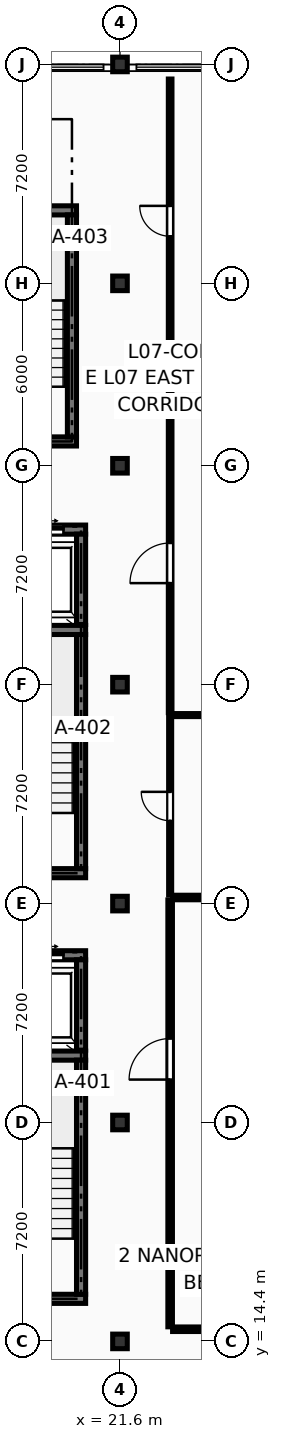
"""IFC4 building model, lengths in metres.
Left out: names, types, materials, properties, quantities, classifications, styles, units other than length and angle.
Written with IfcOpenShell. Run it as: python <this file> out.ifc"""

import sys

from ifc_helpers import new_model, si_unit, direction, frame, frame_2d, origin, origin_2d, place, context, subcontext, project, spatial, rectangle, extrude, element, fill, save


model = new_model("IFC4")
c1 = context("Model", 3, precision=1e-05, world=origin(), true_north=direction((0.0, 1.0)))
c2 = subcontext(c1, "Body", "Model", "MODEL_VIEW")
j1 = project(units=[si_unit("LENGTHUNIT", "METRE"), si_unit("PLANEANGLEUNIT", "RADIAN")], contexts=[c1])
p1 = place(None, origin())
s1 = spatial("IfcSite", under=j1, at=p1, CompositionType="ELEMENT")
p2 = place(p1, origin())
s2 = spatial("IfcBuilding", under=s1, at=p2, CompositionType="ELEMENT")
p3 = place(p2, frame((0.0, 0.0, 26.25)))
s3 = spatial("IfcBuildingStorey", under=s2, at=p3, CompositionType="ELEMENT", Elevation=26.25)
for number, where, z_axis, x_axis in (
    (1, (21.6, 14.4, 0.0), (0.0, 0.0, 1.0), (1.0, 0.0, 0.0)),
    (2, (21.6, 21.6, 0.0), (0.0, 0.0, 1.0), (1.0, 0.0, 0.0)),
    (3, (21.6, 28.8, 0.0), (0.0, 0.0, 1.0), (1.0, 0.0, 0.0)),
    (4, (21.6, 36.0, 0.0), (0.0, 0.0, 1.0), (1.0, 0.0, 0.0)),
    (5, (21.6, 43.2, 0.0), (0.0, 0.0, 1.0), (1.0, 0.0, 0.0)),
    (6, (21.6, 49.2, 0.0), (0.0, 0.0, 1.0), (1.0, 0.0, 0.0)),
    (7, (21.6, 56.4, 0.0), (0.0, 0.0, 1.0), (1.0, 0.0, 0.0)),
):
    element("IfcColumn", number, at=place(p3, frame(where, z_axis=z_axis, x_axis=x_axis)), inside=s3, PredefinedType="COLUMN", context=c2, shape_type="SweptSolid", body=[
        extrude(rectangle(XDim=0.48, YDim=0.48, at=origin_2d()), origin(), (0.0, 0.0, 1.0), 3.45),
    ])
for number, where, z_axis, x_axis in (
    (8, (15.65, 15.8, 0.0), (0.0, 0.0, 1.0), (1.0, 0.0, 0.0)),
    (9, (15.65, 23.8, 0.0), (0.0, 0.0, 1.0), (1.0, 0.0, 0.0)),
):
    element("IfcWall", number, at=place(p3, frame(where, z_axis=z_axis, x_axis=x_axis)), inside=s3, PredefinedType="SHEAR", context=c2, shape_type="SweptSolid", body=[
        extrude(rectangle(XDim=4.82, YDim=0.3, at=frame_2d((2.41, 0.0))), origin(), (0.0, 0.0, 1.0), 3.24),
    ])
p4 = place(p3, frame((20.32, 15.95, 0.0), z_axis=(0.0, 0.0, 1.0), x_axis=(0.0, 1.0, 0.0)))
e10 = element("IfcWall", 10, at=p4, inside=s3, PredefinedType="SHEAR", context=c2, shape_type="SweptSolid", body=[
    extrude(rectangle(XDim=7.7, YDim=0.3, at=frame_2d((3.85, 0.0))), origin(), (0.0, 0.0, 1.0), 3.24),
])
for number, where, z_axis, x_axis in (
    (11, (15.65, 29.8, 0.0), (0.0, 0.0, 1.0), (1.0, 0.0, 0.0)),
    (12, (15.65, 37.8, 0.0), (0.0, 0.0, 1.0), (1.0, 0.0, 0.0)),
):
    element("IfcWall", number, at=place(p3, frame(where, z_axis=z_axis, x_axis=x_axis)), inside=s3, PredefinedType="SHEAR", context=c2, shape_type="SweptSolid", body=[
        extrude(rectangle(XDim=4.82, YDim=0.3, at=frame_2d((2.41, 0.0))), origin(), (0.0, 0.0, 1.0), 3.24),
    ])
p5 = place(p3, frame((20.32, 29.95, 0.0), z_axis=(0.0, 0.0, 1.0), x_axis=(0.0, 1.0, 0.0)))
e13 = element("IfcWall", 13, at=p5, inside=s3, PredefinedType="SHEAR", context=c2, shape_type="SweptSolid", body=[
    extrude(rectangle(XDim=7.7, YDim=0.3, at=frame_2d((3.85, 0.0))), origin(), (0.0, 0.0, 1.0), 3.24),
])
for number, where, z_axis, x_axis in (
    (14, (15.75, 44.0, 0.0), (0.0, 0.0, 1.0), (1.0, 0.0, 0.0)),
    (15, (15.75, 51.6, 0.0), (0.0, 0.0, 1.0), (1.0, 0.0, 0.0)),
):
    element("IfcWall", number, at=place(p3, frame(where, z_axis=z_axis, x_axis=x_axis)), inside=s3, PredefinedType="SHEAR", context=c2, shape_type="SweptSolid", body=[
        extrude(rectangle(XDim=4.42, YDim=0.3, at=frame_2d((2.21, 0.0))), origin(), (0.0, 0.0, 1.0), 3.24),
    ])
p6 = place(p3, frame((20.02, 44.15, 0.0), z_axis=(0.0, 0.0, 1.0), x_axis=(0.0, 1.0, 0.0)))
e16 = element("IfcWall", 16, at=p6, inside=s3, PredefinedType="SHEAR", context=c2, shape_type="SweptSolid", body=[
    extrude(rectangle(XDim=7.3, YDim=0.3, at=frame_2d((3.65, 0.0))), origin(), (0.0, 0.0, 1.0), 3.24),
])
p7 = place(p3, frame((17.91, 27.1, 0.0), z_axis=(0.0, 0.0, 1.0), x_axis=(1.0, 0.0, 0.0)))
e17 = element("IfcWall", 17, at=p7, inside=s3, PredefinedType="SHEAR", context=c2, shape_type="SweptSolid", body=[
    extrude(rectangle(XDim=2.56, YDim=0.3, at=frame_2d((1.28, 0.0))), origin(), (0.0, 0.0, 1.0), 3.24),
])
p8 = place(p7, frame((0.73, 0.0, 0.0)))
e18 = element("IfcOpeningElement", 18, at=p8, cuts=e17, PredefinedType="OPENING", context=c2, shape_type="SweptSolid", body=[
    extrude(rectangle(XDim=1.1, YDim=2.2, at=frame_2d((0.55, 1.1))), frame((0.0, 0.162, 0.0), z_axis=(0.0, -1.0, 0.0), x_axis=(1.0, 0.0, 0.0)), (0.0, 0.0, 1.0), 0.324),
])
p9 = place(p3, frame((20.32, 23.98, 0.0), z_axis=(0.0, 0.0, 1.0), x_axis=(0.0, 1.0, 0.0)))
e19 = element("IfcWall", 19, at=p9, inside=s3, PredefinedType="SHEAR", context=c2, shape_type="SweptSolid", body=[
    extrude(rectangle(XDim=2.97, YDim=0.3, at=frame_2d((1.485, 0.0))), origin(), (0.0, 0.0, 1.0), 3.24),
])
p10 = place(p3, frame((17.91, 41.1, 0.0), z_axis=(0.0, 0.0, 1.0), x_axis=(1.0, 0.0, 0.0)))
e20 = element("IfcWall", 20, at=p10, inside=s3, PredefinedType="SHEAR", context=c2, shape_type="SweptSolid", body=[
    extrude(rectangle(XDim=2.56, YDim=0.3, at=frame_2d((1.28, 0.0))), origin(), (0.0, 0.0, 1.0), 3.24),
])
p11 = place(p10, frame((0.73, 0.0, 0.0)))
e21 = element("IfcOpeningElement", 21, at=p11, cuts=e20, PredefinedType="OPENING", context=c2, shape_type="SweptSolid", body=[
    extrude(rectangle(XDim=1.1, YDim=2.2, at=frame_2d((0.55, 1.1))), frame((0.0, 0.162, 0.0), z_axis=(0.0, -1.0, 0.0), x_axis=(1.0, 0.0, 0.0)), (0.0, 0.0, 1.0), 0.324),
])
p12 = place(p3, frame((20.32, 37.98, 0.0), z_axis=(0.0, 0.0, 1.0), x_axis=(0.0, 1.0, 0.0)))
e22 = element("IfcWall", 22, at=p12, inside=s3, PredefinedType="SHEAR", context=c2, shape_type="SweptSolid", body=[
    extrude(rectangle(XDim=2.97, YDim=0.3, at=frame_2d((1.485, 0.0))), origin(), (0.0, 0.0, 1.0), 3.24),
])
p13 = place(p3, frame((23.25, 14.88, 0.0), z_axis=(0.0, 0.0, 1.0), x_axis=(0.0, 1.0, 0.0)))
e23 = element("IfcWall", 23, at=p13, inside=s3, PredefinedType="PARTITIONING", context=c2, shape_type="SweptSolid", body=[
    extrude(rectangle(XDim=14.04, YDim=0.15, at=frame_2d((7.02, 0.0))), origin(), (0.0, 0.0, 1.0), 3.225),
])
p14 = place(p13, frame((8.132, 0.0, 0.0)))
e24 = element("IfcOpeningElement", 24, at=p14, cuts=e23, PredefinedType="OPENING", context=c2, shape_type="SweptSolid", body=[
    extrude(rectangle(XDim=1.35, YDim=2.2, at=frame_2d((0.675, 1.1))), frame((0.0, 0.087, 0.0), z_axis=(0.0, -1.0, 0.0), x_axis=(1.0, 0.0, 0.0)), (0.0, 0.0, 1.0), 0.174),
])
p15 = place(p3, frame((23.33, 14.8, 0.0), z_axis=(0.0, 0.0, 1.0), x_axis=(1.0, 0.0, 0.0)))
e25 = element("IfcWall", 25, at=p15, inside=s3, PredefinedType="PARTITIONING", context=c2, shape_type="SweptSolid", body=[
    extrude(rectangle(XDim=4.99, YDim=0.15, at=frame_2d((2.495, 0.0))), origin(), (0.0, 0.0, 1.0), 3.225),
])
p16 = place(p3, frame((23.33, 29.0, 0.0), z_axis=(0.0, 0.0, 1.0), x_axis=(1.0, 0.0, 0.0)))
e26 = element("IfcWall", 26, at=p16, inside=s3, PredefinedType="PARTITIONING", context=c2, shape_type="SweptSolid", body=[
    extrude(rectangle(XDim=4.99, YDim=0.15, at=frame_2d((2.495, 0.0))), origin(), (0.0, 0.0, 1.0), 2.541),
])
p17 = place(p3, frame((23.25, 29.08, 0.0), z_axis=(0.0, 0.0, 1.0), x_axis=(0.0, 1.0, 0.0)))
e27 = element("IfcWall", 27, at=p17, inside=s3, PredefinedType="PARTITIONING", context=c2, shape_type="SweptSolid", body=[
    extrude(rectangle(XDim=5.84, YDim=0.1, at=frame_2d((2.92, 0.0))), origin(), (0.0, 0.0, 1.0), 3.225),
])
p18 = place(p17, frame((2.445, 0.0, 0.0)))
e28 = element("IfcOpeningElement", 28, at=p18, cuts=e27, PredefinedType="OPENING", context=c2, shape_type="SweptSolid", body=[
    extrude(rectangle(XDim=0.95, YDim=2.1, at=frame_2d((0.475, 1.05))), frame((0.0, 0.062, 0.0), z_axis=(0.0, -1.0, 0.0), x_axis=(1.0, 0.0, 0.0)), (0.0, 0.0, 1.0), 0.124),
])
p19 = place(p3, frame((23.33, 35.0, 0.0), z_axis=(0.0, 0.0, 1.0), x_axis=(1.0, 0.0, 0.0)))
e29 = element("IfcWall", 29, at=p19, inside=s3, PredefinedType="PARTITIONING", context=c2, shape_type="SweptSolid", body=[
    extrude(rectangle(XDim=4.99, YDim=0.1, at=frame_2d((2.495, 0.0))), origin(), (0.0, 0.0, 1.0), 3.225),
])
p20 = place(p3, frame((23.25, 35.08, 0.0), z_axis=(0.0, 0.0, 1.0), x_axis=(0.0, 1.0, 0.0)))
e30 = element("IfcWall", 30, at=p20, inside=s3, PredefinedType="PARTITIONING", context=c2, shape_type="SweptSolid", body=[
    extrude(rectangle(XDim=9.84, YDim=0.12, at=frame_2d((4.92, 0.0))), origin(), (0.0, 0.0, 1.0), 3.225),
])
p21 = place(p20, frame((4.26, 0.0, 0.0)))
e31 = element("IfcOpeningElement", 31, at=p21, cuts=e30, PredefinedType="OPENING", context=c2, shape_type="SweptSolid", body=[
    extrude(rectangle(XDim=1.32, YDim=2.2, at=frame_2d((0.66, 1.1))), frame((0.0, 0.072, 0.0), z_axis=(0.0, -1.0, 0.0), x_axis=(1.0, 0.0, 0.0)), (0.0, 0.0, 1.0), 0.144),
])
p22 = place(p3, frame((23.33, 45.0, 0.0), z_axis=(0.0, 0.0, 1.0), x_axis=(1.0, 0.0, 0.0)))
e32 = element("IfcWall", 32, at=p22, inside=s3, PredefinedType="PARTITIONING", context=c2, shape_type="SweptSolid", body=[
    extrude(rectangle(XDim=4.99, YDim=0.12, at=frame_2d((2.495, 0.0))), origin(), (0.0, 0.0, 1.0), 3.225),
])
p23 = place(p3, frame((23.25, 45.08, 0.0), z_axis=(0.0, 0.0, 1.0), x_axis=(0.0, 1.0, 0.0)))
e33 = element("IfcWall", 33, at=p23, inside=s3, PredefinedType="PARTITIONING", context=c2, shape_type="SweptSolid", body=[
    extrude(rectangle(XDim=10.84, YDim=0.12, at=frame_2d((5.42, 0.0))), origin(), (0.0, 0.0, 1.0), 3.225),
])
p24 = place(p23, frame((5.668, 0.0, 0.0)))
e34 = element("IfcOpeningElement", 34, at=p24, cuts=e33, PredefinedType="OPENING", context=c2, shape_type="SweptSolid", body=[
    extrude(rectangle(XDim=1.0, YDim=2.15, at=frame_2d((0.5, 1.075))), frame((0.0, 0.072, 0.0), z_axis=(0.0, -1.0, 0.0), x_axis=(1.0, 0.0, 0.0)), (0.0, 0.0, 1.0), 0.144),
])
p25 = place(p8, origin())
e35 = element("IfcDoor", 35, at=p25, inside=s3, OperationType="DOUBLE_DOOR_SLIDING", PredefinedType="DOOR", context=c2, shape_type="SweptSolid", body=[
    extrude(rectangle(XDim=1.1, YDim=2.2, at=frame_2d((0.55, 1.1))), frame((0.0, 0.025, 0.0), z_axis=(0.0, -1.0, 0.0), x_axis=(1.0, 0.0, 0.0)), (0.0, 0.0, 1.0), 0.05),
])
fill(e18, e35)
p26 = place(p11, origin())
e36 = element("IfcDoor", 36, at=p26, inside=s3, OperationType="DOUBLE_DOOR_SLIDING", PredefinedType="DOOR", context=c2, shape_type="SweptSolid", body=[
    extrude(rectangle(XDim=1.1, YDim=2.2, at=frame_2d((0.55, 1.1))), frame((0.0, 0.025, 0.0), z_axis=(0.0, -1.0, 0.0), x_axis=(1.0, 0.0, 0.0)), (0.0, 0.0, 1.0), 0.05),
])
fill(e21, e36)
p27 = place(p14, origin())
e37 = element("IfcDoor", 37, at=p27, inside=s3, OperationType="SINGLE_SWING_LEFT", PredefinedType="DOOR", context=c2, shape_type="SweptSolid", body=[
    extrude(rectangle(XDim=1.35, YDim=2.2, at=frame_2d((0.675, 1.1))), frame((0.0, 0.025, 0.0), z_axis=(0.0, -1.0, 0.0), x_axis=(1.0, 0.0, 0.0)), (0.0, 0.0, 1.0), 0.05),
])
fill(e24, e37)
p28 = place(p18, origin())
e38 = element("IfcDoor", 38, at=p28, inside=s3, OperationType="SINGLE_SWING_RIGHT", PredefinedType="DOOR", context=c2, shape_type="SweptSolid", body=[
    extrude(rectangle(XDim=0.95, YDim=2.1, at=frame_2d((0.475, 1.05))), frame((0.0, 0.025, 0.0), z_axis=(0.0, -1.0, 0.0), x_axis=(1.0, 0.0, 0.0)), (0.0, 0.0, 1.0), 0.05),
])
fill(e28, e38)
p29 = place(p21, origin())
e39 = element("IfcDoor", 39, at=p29, inside=s3, OperationType="SINGLE_SWING_LEFT", PredefinedType="DOOR", context=c2, shape_type="SweptSolid", body=[
    extrude(rectangle(XDim=1.32, YDim=2.2, at=frame_2d((0.66, 1.1))), frame((0.0, 0.025, 0.0), z_axis=(0.0, -1.0, 0.0), x_axis=(1.0, 0.0, 0.0)), (0.0, 0.0, 1.0), 0.05),
])
fill(e31, e39)
p30 = place(p24, origin())
e40 = element("IfcDoor", 40, at=p30, inside=s3, OperationType="SINGLE_SWING_RIGHT", PredefinedType="DOOR", context=c2, shape_type="SweptSolid", body=[
    extrude(rectangle(XDim=1.0, YDim=2.15, at=frame_2d((0.5, 1.075))), frame((0.0, 0.025, 0.0), z_axis=(0.0, -1.0, 0.0), x_axis=(1.0, 0.0, 0.0)), (0.0, 0.0, 1.0), 0.05),
])
fill(e34, e40)
save(model, sys.argv[1])
